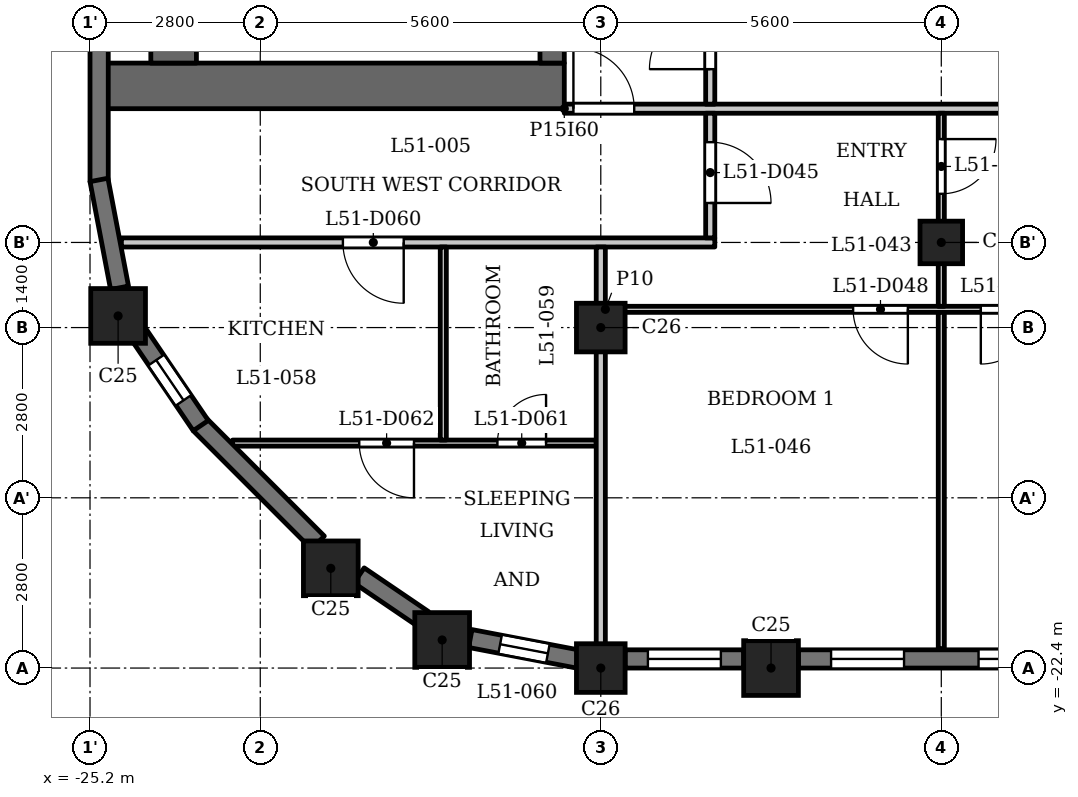
"""IFC4 building model, lengths in metres.
Left out: names, types, materials, properties, quantities, classifications, styles, units other than length and angle.
Written with IfcOpenShell. Run it as: python <this file> out.ifc"""

import sys

from ifc_helpers import new_model, si_unit, direction, frame, frame_2d, origin, origin_2d, place, context, subcontext, project, spatial, rectangle, extrude, element, fill, save


model = new_model("IFC4")
c1 = context("Model", 3, precision=1e-05, world=origin(), true_north=direction((0.0, 1.0)))
c2 = subcontext(c1, "Body", "Model", "MODEL_VIEW")
j1 = project(units=[si_unit("LENGTHUNIT", "METRE"), si_unit("PLANEANGLEUNIT", "RADIAN")], contexts=[c1])
p1 = place(None, origin())
s1 = spatial("IfcSite", under=j1, at=p1, CompositionType="ELEMENT")
p2 = place(p1, origin())
s2 = spatial("IfcBuilding", under=s1, at=p2, CompositionType="ELEMENT")
p3 = place(p2, frame((0.0, 0.0, 199.4)))
s3 = spatial("IfcBuildingStorey", under=s2, at=p3, CompositionType="ELEMENT", Elevation=199.4)
for number, where, z_axis, x_axis in (
    (1, (-19.409, -21.938, 0.0), (0.0, 0.0, 1.0), (1.0, 0.0, 0.0)),
    (2, (-14.0, -22.4, 0.0), (0.0, 0.0, 1.0), (1.0, 0.0, 0.0)),
    (3, (-24.738, -16.609, 0.0), (0.0, 0.0, 1.0), (1.0, 0.0, 0.0)),
    (4, (-21.24, -20.76, 0.0), (0.0, 0.0, 1.0), (1.0, 0.0, 0.0)),
):
    element("IfcColumn", number, at=place(p3, frame(where, z_axis=z_axis, x_axis=x_axis)), inside=s3, PredefinedType="COLUMN", context=c2, shape_type="SweptSolid", body=[
        extrude(rectangle(XDim=0.9, YDim=0.9, at=origin_2d()), origin(), (0.0, 0.0, 1.0), 3.5),
    ])
for number, where, z_axis, x_axis in (
    (5, (-16.8, -22.4, 0.0), (0.0, 0.0, 1.0), (1.0, 0.0, 0.0)),
    (6, (-16.8, -16.8, 0.0), (0.0, 0.0, 1.0), (1.0, 0.0, 0.0)),
):
    element("IfcColumn", number, at=place(p3, frame(where, z_axis=z_axis, x_axis=x_axis)), inside=s3, PredefinedType="COLUMN", context=c2, shape_type="SweptSolid", body=[
        extrude(rectangle(XDim=0.8, YDim=0.8, at=origin_2d()), origin(), (0.0, 0.0, 1.0), 3.5),
    ])
p4 = place(p3, frame((-11.2, -15.4, 0.0), z_axis=(0.0, 0.0, 1.0), x_axis=(1.0, 0.0, 0.0)))
e7 = element("IfcColumn", 7, at=p4, inside=s3, PredefinedType="COLUMN", context=c2, shape_type="SweptSolid", body=[
    extrude(rectangle(XDim=0.7, YDim=0.7, at=origin_2d()), origin(), (0.0, 0.0, 1.0), 3.5),
])
p5 = place(p3, frame((-23.397, -18.391, 0.0), z_axis=(0.0, 0.0, 1.0), x_axis=(0.707106781187, -0.707106781187, 0.0)))
e8 = element("IfcWall", 8, at=p5, inside=s3, PredefinedType="SOLIDWALL", context=c2, shape_type="SweptSolid", body=[
    extrude(rectangle(XDim=2.75, YDim=0.3, at=frame_2d((1.375, 0.0))), origin(), (0.0, 0.0, 1.0), 2.5),
])
p6 = place(p3, frame((-20.775, -20.876, 0.0), z_axis=(0.0, 0.0, 1.0), x_axis=(0.827075824828, -0.562090366388, 0.0)))
e9 = element("IfcWall", 9, at=p6, inside=s3, PredefinedType="SOLIDWALL", context=c2, shape_type="SweptSolid", body=[
    extrude(rectangle(XDim=1.277, YDim=0.3, at=frame_2d((0.638, 0.0))), origin(), (0.0, 0.0, 1.0), 2.5),
])
p7 = place(p3, frame((-18.946, -21.914, 0.0), z_axis=(0.0, 0.0, 1.0), x_axis=(0.98230529033, -0.187286722942, 0.0)))
e10 = element("IfcWall", 10, at=p7, inside=s3, PredefinedType="SOLIDWALL", context=c2, shape_type="SweptSolid", body=[
    extrude(rectangle(XDim=1.799, YDim=0.3, at=frame_2d((0.899, 0.0))), origin(), (0.0, 0.0, 1.0), 2.5),
])
p8 = place(p7, frame((0.5, 0.0, 0.6)))
e11 = element("IfcOpeningElement", 11, at=p8, cuts=e10, PredefinedType="OPENING", context=c2, shape_type="SweptSolid", body=[
    extrude(rectangle(XDim=0.8, YDim=1.55, at=frame_2d((0.4, 0.775))), frame((0.0, 0.16, 0.0), z_axis=(0.0, -1.0, 0.0), x_axis=(1.0, 0.0, 0.0)), (0.0, 0.0, 1.0), 0.32),
])
p9 = place(p3, frame((-16.4, -22.25, 0.0), z_axis=(0.0, 0.0, 1.0), x_axis=(1.0, 0.0, 0.0)))
e12 = element("IfcWall", 12, at=p9, inside=s3, PredefinedType="SOLIDWALL", context=c2, shape_type="SweptSolid", body=[
    extrude(rectangle(XDim=1.95, YDim=0.3, at=frame_2d((0.975, 0.0))), origin(), (0.0, 0.0, 1.0), 2.5),
])
p10 = place(p9, frame((0.375, 0.0, 0.6)))
e13 = element("IfcOpeningElement", 13, at=p10, cuts=e12, PredefinedType="OPENING", context=c2, shape_type="SweptSolid", body=[
    extrude(rectangle(XDim=1.2, YDim=1.55, at=frame_2d((0.6, 0.775))), frame((0.0, 0.16, 0.0), z_axis=(0.0, -1.0, 0.0), x_axis=(1.0, 0.0, 0.0)), (0.0, 0.0, 1.0), 0.32),
])
p11 = place(p3, frame((-13.55, -22.25, 0.0), z_axis=(0.0, 0.0, 1.0), x_axis=(1.0, 0.0, 0.0)))
e14 = element("IfcWall", 14, at=p11, inside=s3, PredefinedType="SOLIDWALL", context=c2, shape_type="SweptSolid", body=[
    extrude(rectangle(XDim=4.7, YDim=0.3, at=frame_2d((2.35, 0.0))), origin(), (0.0, 0.0, 1.0), 2.5),
])
p12 = place(p11, frame((0.538, 0.0, 0.6)))
e15 = element("IfcOpeningElement", 15, at=p12, cuts=e14, PredefinedType="OPENING", context=c2, shape_type="SweptSolid", body=[
    extrude(rectangle(XDim=1.2, YDim=1.55, at=frame_2d((0.6, 0.775))), frame((0.0, 0.16, 0.0), z_axis=(0.0, -1.0, 0.0), x_axis=(1.0, 0.0, 0.0)), (0.0, 0.0, 1.0), 0.32),
])
p13 = place(p11, frame((2.962, 0.0, 0.6)))
e16 = element("IfcOpeningElement", 16, at=p13, cuts=e14, PredefinedType="OPENING", context=c2, shape_type="SweptSolid", body=[
    extrude(rectangle(XDim=1.2, YDim=1.55, at=frame_2d((0.6, 0.775))), frame((0.0, 0.16, 0.0), z_axis=(0.0, -1.0, 0.0), x_axis=(1.0, 0.0, 0.0)), (0.0, 0.0, 1.0), 0.32),
])
p14 = place(p3, frame((-25.05, -11.65, 0.0), z_axis=(0.0, 0.0, 1.0), x_axis=(0.0, -1.0, 0.0)))
e17 = element("IfcWall", 17, at=p14, inside=s3, PredefinedType="SOLIDWALL", context=c2, shape_type="SweptSolid", body=[
    extrude(rectangle(XDim=2.75, YDim=0.3, at=frame_2d((1.375, 0.0))), origin(), (0.0, 0.0, 1.0), 2.5),
])
p15 = place(p3, frame((-25.053, -14.372, 0.0), z_axis=(0.0, 0.0, 1.0), x_axis=(0.187348135549, -0.982293579388, 0.0)))
e18 = element("IfcWall", 18, at=p15, inside=s3, PredefinedType="SOLIDWALL", context=c2, shape_type="SweptSolid", body=[
    extrude(rectangle(XDim=1.806, YDim=0.3, at=frame_2d((0.903, 0.0))), origin(), (0.0, 0.0, 1.0), 2.5),
])
p16 = place(p3, frame((-24.394, -16.919, 0.0), z_axis=(0.0, 0.0, 1.0), x_axis=(0.562040093569, -0.827109988588, 0.0)))
e19 = element("IfcWall", 19, at=p16, inside=s3, PredefinedType="SOLIDWALL", context=c2, shape_type="SweptSolid", body=[
    extrude(rectangle(XDim=1.806, YDim=0.3, at=frame_2d((0.903, 0.0))), origin(), (0.0, 0.0, 1.0), 2.5),
])
p17 = place(p16, frame((0.503, 0.0, 0.6)))
e20 = element("IfcOpeningElement", 20, at=p17, cuts=e19, PredefinedType="OPENING", context=c2, shape_type="SweptSolid", body=[
    extrude(rectangle(XDim=0.8, YDim=1.55, at=frame_2d((0.4, 0.775))), frame((0.0, 0.16, 0.0), z_axis=(0.0, -1.0, 0.0), x_axis=(1.0, 0.0, 0.0)), (0.0, 0.0, 1.0), 0.32),
])
p18 = place(p3, frame((-17.4, -12.825, 0.0), z_axis=(0.0, 0.0, 1.0), x_axis=(-1.0, 0.0, 0.0)))
e21 = element("IfcWall", 21, at=p18, inside=s3, PredefinedType="SHEAR", context=c2, shape_type="SweptSolid", body=[
    extrude(rectangle(XDim=7.6, YDim=0.75, at=frame_2d((3.8, 0.0))), origin(), (0.0, 0.0, 1.0), 3.2),
])
p19 = place(p3, frame((-17.6, -12.45, 0.0), z_axis=(0.0, 0.0, 1.0), x_axis=(0.0, 1.0, 0.0)))
e22 = element("IfcWall", 22, at=p19, inside=s3, PredefinedType="SHEAR", context=c2, shape_type="SweptSolid", body=[
    extrude(rectangle(XDim=24.9, YDim=0.4, at=frame_2d((12.45, 0.0))), origin(), (0.0, 0.0, 1.0), 3.2),
])
p20 = place(p19, frame((8.65, 0.0, 0.0)))
e23 = element("IfcOpeningElement", 23, at=p20, cuts=e22, PredefinedType="OPENING", context=c2, shape_type="SweptSolid", body=[
    extrude(rectangle(XDim=0.9, YDim=2.1, at=frame_2d((0.45, 1.05))), frame((0.0, 0.21, 0.0), z_axis=(0.0, -1.0, 0.0), x_axis=(1.0, 0.0, 0.0)), (0.0, 0.0, 1.0), 0.42),
])
p21 = place(p19, frame((15.6, 0.0, 0.0)))
e24 = element("IfcOpeningElement", 24, at=p21, cuts=e22, PredefinedType="OPENING", context=c2, shape_type="SweptSolid", body=[
    extrude(rectangle(XDim=1.1, YDim=2.1, at=frame_2d((0.55, 1.05))), frame((0.0, 0.21, 0.0), z_axis=(0.0, -1.0, 0.0), x_axis=(1.0, 0.0, 0.0)), (0.0, 0.0, 1.0), 0.42),
])
p22 = place(p19, frame((18.0, 0.0, 0.0)))
e25 = element("IfcOpeningElement", 25, at=p22, cuts=e22, PredefinedType="OPENING", context=c2, shape_type="SweptSolid", body=[
    extrude(rectangle(XDim=1.1, YDim=2.1, at=frame_2d((0.55, 1.05))), frame((0.0, 0.21, 0.0), z_axis=(0.0, -1.0, 0.0), x_axis=(1.0, 0.0, 0.0)), (0.0, 0.0, 1.0), 0.42),
])
p23 = place(p19, frame((23.025, 0.0, 0.0)))
e26 = element("IfcOpeningElement", 26, at=p23, cuts=e22, PredefinedType="OPENING", context=c2, shape_type="SweptSolid", body=[
    extrude(rectangle(XDim=1.1, YDim=2.1, at=frame_2d((0.55, 1.05))), frame((0.0, 0.21, 0.0), z_axis=(0.0, -1.0, 0.0), x_axis=(1.0, 0.0, 0.0)), (0.0, 0.0, 1.0), 0.42),
])
p24 = place(p19, frame((0.775, 0.0, 0.0)))
e27 = element("IfcOpeningElement", 27, at=p24, cuts=e22, PredefinedType="OPENING", context=c2, shape_type="SweptSolid", body=[
    extrude(rectangle(XDim=1.1, YDim=2.1, at=frame_2d((0.55, 1.05))), frame((0.0, 0.21, 0.0), z_axis=(0.0, -1.0, 0.0), x_axis=(1.0, 0.0, 0.0)), (0.0, 0.0, 1.0), 0.42),
])
p25 = place(p19, frame((12.925, 0.0, 0.0)))
e28 = element("IfcOpeningElement", 28, at=p25, cuts=e22, PredefinedType="OPENING", context=c2, shape_type="SweptSolid", body=[
    extrude(rectangle(XDim=1.8, YDim=2.1, at=frame_2d((0.9, 1.05))), frame((0.0, 0.21, 0.0), z_axis=(0.0, -1.0, 0.0), x_axis=(1.0, 0.0, 0.0)), (0.0, 0.0, 1.0), 0.42),
])
p26 = place(p3, frame((-23.825, -12.45, 0.0), z_axis=(0.0, 0.0, 1.0), x_axis=(0.0, 1.0, 0.0)))
e29 = element("IfcWall", 29, at=p26, inside=s3, PredefinedType="SHEAR", context=c2, shape_type="SweptSolid", body=[
    extrude(rectangle(XDim=24.9, YDim=0.75, at=frame_2d((12.45, 0.0))), origin(), (0.0, 0.0, 1.0), 3.2),
])
p27 = place(p3, frame((-22.856, -18.7, 0.0), z_axis=(0.0, 0.0, 1.0), x_axis=(1.0, 0.0, 0.0)))
e30 = element("IfcWall", 30, at=p27, inside=s3, PredefinedType="PARTITIONING", context=c2, shape_type="SweptSolid", body=[
    extrude(rectangle(XDim=5.981, YDim=0.1, at=frame_2d((2.99, 0.0))), origin(), (0.0, 0.0, 1.0), 3.2),
])
p28 = place(p27, frame((4.356, 0.0, 0.0)))
e31 = element("IfcOpeningElement", 31, at=p28, cuts=e30, PredefinedType="OPENING", context=c2, shape_type="SweptSolid", body=[
    extrude(rectangle(XDim=0.8, YDim=2.1, at=frame_2d((0.4, 1.05))), frame((0.0, 0.06, 0.0), z_axis=(0.0, -1.0, 0.0), x_axis=(1.0, 0.0, 0.0)), (0.0, 0.0, 1.0), 0.12),
])
p29 = place(p27, frame((2.084, 0.0, 0.0)))
e32 = element("IfcOpeningElement", 32, at=p29, cuts=e30, PredefinedType="OPENING", context=c2, shape_type="SweptSolid", body=[
    extrude(rectangle(XDim=0.9, YDim=2.1, at=frame_2d((0.45, 1.05))), frame((0.0, 0.06, 0.0), z_axis=(0.0, -1.0, 0.0), x_axis=(1.0, 0.0, 0.0)), (0.0, 0.0, 1.0), 0.12),
])
p30 = place(p3, frame((-16.725, -16.5, 0.0), z_axis=(0.0, 0.0, 1.0), x_axis=(1.0, 0.0, 0.0)))
e33 = element("IfcWall", 33, at=p30, inside=s3, PredefinedType="PARTITIONING", context=c2, shape_type="SweptSolid", body=[
    extrude(rectangle(XDim=33.45, YDim=0.1, at=frame_2d((16.725, 0.0))), origin(), (0.0, 0.0, 1.0), 3.2),
])
p31 = place(p30, frame((4.075, 0.0, 0.0)))
e34 = element("IfcOpeningElement", 34, at=p31, cuts=e33, PredefinedType="OPENING", context=c2, shape_type="SweptSolid", body=[
    extrude(rectangle(XDim=0.9, YDim=2.1, at=frame_2d((0.45, 1.05))), frame((0.0, 0.06, 0.0), z_axis=(0.0, -1.0, 0.0), x_axis=(1.0, 0.0, 0.0)), (0.0, 0.0, 1.0), 0.12),
])
p32 = place(p30, frame((6.175, 0.0, 0.0)))
e35 = element("IfcOpeningElement", 35, at=p32, cuts=e33, PredefinedType="OPENING", context=c2, shape_type="SweptSolid", body=[
    extrude(rectangle(XDim=0.9, YDim=2.1, at=frame_2d((0.45, 1.05))), frame((0.0, 0.06, 0.0), z_axis=(0.0, -1.0, 0.0), x_axis=(1.0, 0.0, 0.0)), (0.0, 0.0, 1.0), 0.12),
])
p33 = place(p30, frame((30.575, 0.0, 0.0)))
e36 = element("IfcOpeningElement", 36, at=p33, cuts=e33, PredefinedType="OPENING", context=c2, shape_type="SweptSolid", body=[
    extrude(rectangle(XDim=0.9, YDim=2.1, at=frame_2d((0.45, 1.05))), frame((0.0, 0.06, 0.0), z_axis=(0.0, -1.0, 0.0), x_axis=(1.0, 0.0, 0.0)), (0.0, 0.0, 1.0), 0.12),
])
p34 = place(p30, frame((22.975, 0.0, 0.0)))
e37 = element("IfcOpeningElement", 37, at=p34, cuts=e33, PredefinedType="OPENING", context=c2, shape_type="SweptSolid", body=[
    extrude(rectangle(XDim=0.9, YDim=2.1, at=frame_2d((0.45, 1.05))), frame((0.0, 0.06, 0.0), z_axis=(0.0, -1.0, 0.0), x_axis=(1.0, 0.0, 0.0)), (0.0, 0.0, 1.0), 0.12),
])
p35 = place(p3, frame((-24.684, -15.4, 0.0), z_axis=(0.0, 0.0, 1.0), x_axis=(1.0, 0.0, 0.0)))
e38 = element("IfcWall", 38, at=p35, inside=s3, PredefinedType="PARTITIONING", context=c2, shape_type="SweptSolid", body=[
    extrude(rectangle(XDim=9.759, YDim=0.15, at=frame_2d((4.879, 0.0))), origin(), (0.0, 0.0, 1.0), 3.2),
])
p36 = place(p35, frame((3.643, 0.0, 0.0)))
e39 = element("IfcOpeningElement", 39, at=p36, cuts=e38, PredefinedType="OPENING", context=c2, shape_type="SweptSolid", body=[
    extrude(rectangle(XDim=1.0, YDim=2.1, at=frame_2d((0.5, 1.05))), frame((0.0, 0.085, 0.0), z_axis=(0.0, -1.0, 0.0), x_axis=(1.0, 0.0, 0.0)), (0.0, 0.0, 1.0), 0.17),
])
p37 = place(p3, frame((-17.4, -13.2, 0.0), z_axis=(0.0, 0.0, 1.0), x_axis=(1.0, 0.0, 0.0)))
e40 = element("IfcWall", 40, at=p37, inside=s3, PredefinedType="PARTITIONING", context=c2, shape_type="SweptSolid", body=[
    extrude(rectangle(XDim=34.8, YDim=0.15, at=frame_2d((17.4, 0.0))), origin(), (0.0, 0.0, 1.0), 3.2),
])
p38 = place(p37, frame((0.15, 0.0, 0.0)))
e41 = element("IfcOpeningElement", 41, at=p38, cuts=e40, PredefinedType="OPENING", context=c2, shape_type="SweptSolid", body=[
    extrude(rectangle(XDim=1.0, YDim=2.1, at=frame_2d((0.5, 1.05))), frame((0.0, 0.085, 0.0), z_axis=(0.0, -1.0, 0.0), x_axis=(1.0, 0.0, 0.0)), (0.0, 0.0, 1.0), 0.17),
])
p39 = place(p37, frame((33.55, 0.0, 0.0)))
e42 = element("IfcOpeningElement", 42, at=p39, cuts=e40, PredefinedType="OPENING", context=c2, shape_type="SweptSolid", body=[
    extrude(rectangle(XDim=1.0, YDim=2.1, at=frame_2d((0.5, 1.05))), frame((0.0, 0.085, 0.0), z_axis=(0.0, -1.0, 0.0), x_axis=(1.0, 0.0, 0.0)), (0.0, 0.0, 1.0), 0.17),
])
p40 = place(p3, frame((-19.39, -18.65, 0.0), z_axis=(0.0, 0.0, 1.0), x_axis=(0.0, 1.0, 0.0)))
e43 = element("IfcWall", 43, at=p40, inside=s3, PredefinedType="PARTITIONING", context=c2, shape_type="SweptSolid", body=[
    extrude(rectangle(XDim=3.175, YDim=0.1, at=frame_2d((1.587, 0.0))), origin(), (0.0, 0.0, 1.0), 3.2),
])
p41 = place(p3, frame((-16.8, -22.31, 0.0), z_axis=(0.0, 0.0, 1.0), x_axis=(0.0, 1.0, 0.0)))
e44 = element("IfcWall", 44, at=p41, inside=s3, PredefinedType="PARTITIONING", context=c2, shape_type="SweptSolid", body=[
    extrude(rectangle(XDim=6.835, YDim=0.15, at=frame_2d((3.417, 0.0))), origin(), (0.0, 0.0, 1.0), 2.55),
])
p42 = place(p3, frame((-15.0, -15.325, 0.0), z_axis=(0.0, 0.0, 1.0), x_axis=(0.0, 1.0, 0.0)))
e45 = element("IfcWall", 45, at=p42, inside=s3, PredefinedType="PARTITIONING", context=c2, shape_type="SweptSolid", body=[
    extrude(rectangle(XDim=2.05, YDim=0.15, at=frame_2d((1.025, 0.0))), origin(), (0.0, 0.0, 1.0), 3.2),
])
p43 = place(p42, frame((0.574, 0.0, 0.0)))
e46 = element("IfcOpeningElement", 46, at=p43, cuts=e45, PredefinedType="OPENING", context=c2, shape_type="SweptSolid", body=[
    extrude(rectangle(XDim=1.0, YDim=2.1, at=frame_2d((0.5, 1.05))), frame((0.0, 0.085, 0.0), z_axis=(0.0, -1.0, 0.0), x_axis=(1.0, 0.0, 0.0)), (0.0, 0.0, 1.0), 0.17),
])
p44 = place(p3, frame((-15.0, -13.125, 0.0), z_axis=(0.0, 0.0, 1.0), x_axis=(0.0, 1.0, 0.0)))
e47 = element("IfcWall", 47, at=p44, inside=s3, PredefinedType="PARTITIONING", context=c2, shape_type="SweptSolid", body=[
    extrude(rectangle(XDim=6.356, YDim=0.15, at=frame_2d((3.178, 0.0))), origin(), (0.0, 0.0, 1.0), 3.2),
])
p45 = place(p44, frame((0.575, 0.0, 0.0)))
e48 = element("IfcOpeningElement", 48, at=p45, cuts=e47, PredefinedType="OPENING", context=c2, shape_type="SweptSolid", body=[
    extrude(rectangle(XDim=1.0, YDim=2.1, at=frame_2d((0.5, 1.05))), frame((0.0, 0.085, 0.0), z_axis=(0.0, -1.0, 0.0), x_axis=(1.0, 0.0, 0.0)), (0.0, 0.0, 1.0), 0.17),
])
p46 = place(p3, frame((-11.2, -22.08, 0.0), z_axis=(0.0, 0.0, 1.0), x_axis=(0.0, 1.0, 0.0)))
e49 = element("IfcWall", 49, at=p46, inside=s3, PredefinedType="PARTITIONING", context=c2, shape_type="SweptSolid", body=[
    extrude(rectangle(XDim=5.53, YDim=0.1, at=frame_2d((2.765, 0.0))), origin(), (0.0, 0.0, 1.0), 3.2),
])
p47 = place(p3, frame((-11.2, -16.45, 0.0), z_axis=(0.0, 0.0, 1.0), x_axis=(0.0, 1.0, 0.0)))
e50 = element("IfcWall", 50, at=p47, inside=s3, PredefinedType="PARTITIONING", context=c2, shape_type="SweptSolid", body=[
    extrude(rectangle(XDim=3.175, YDim=0.1, at=frame_2d((1.587, 0.0))), origin(), (0.0, 0.0, 1.0), 3.2),
])
p48 = place(p47, frame((1.85, 0.0, 0.0)))
e51 = element("IfcOpeningElement", 51, at=p48, cuts=e50, PredefinedType="OPENING", context=c2, shape_type="SweptSolid", body=[
    extrude(rectangle(XDim=0.9, YDim=2.1, at=frame_2d((0.45, 1.05))), frame((0.0, 0.06, 0.0), z_axis=(0.0, -1.0, 0.0), x_axis=(1.0, 0.0, 0.0)), (0.0, 0.0, 1.0), 0.12),
])
p49 = place(p45, origin())
e52 = element("IfcDoor", 52, at=p49, inside=s3, OperationType="SINGLE_SWING_RIGHT", PredefinedType="DOOR", context=c2, shape_type="SweptSolid", body=[
    extrude(rectangle(XDim=1.0, YDim=2.1, at=frame_2d((0.5, 1.05))), frame((0.0, 0.025, 0.0), z_axis=(0.0, -1.0, 0.0), x_axis=(1.0, 0.0, 0.0)), (0.0, 0.0, 1.0), 0.05),
])
fill(e48, e52)
p50 = place(p38, origin())
e53 = element("IfcDoor", 53, at=p50, inside=s3, OperationType="SINGLE_SWING_RIGHT", PredefinedType="DOOR", context=c2, shape_type="SweptSolid", body=[
    extrude(rectangle(XDim=1.0, YDim=2.1, at=frame_2d((0.5, 1.05))), frame((0.0, 0.025, 0.0), z_axis=(0.0, -1.0, 0.0), x_axis=(1.0, 0.0, 0.0)), (0.0, 0.0, 1.0), 0.05),
])
fill(e41, e53)
p51 = place(p43, origin())
e54 = element("IfcDoor", 54, at=p51, inside=s3, OperationType="SINGLE_SWING_LEFT", PredefinedType="DOOR", context=c2, shape_type="SweptSolid", body=[
    extrude(rectangle(XDim=1.0, YDim=2.1, at=frame_2d((0.5, 1.05))), frame((0.0, 0.025, 0.0), z_axis=(0.0, -1.0, 0.0), x_axis=(1.0, 0.0, 0.0)), (0.0, 0.0, 1.0), 0.05),
])
fill(e46, e54)
p52 = place(p48, origin())
e55 = element("IfcDoor", 55, at=p52, inside=s3, OperationType="SINGLE_SWING_RIGHT", PredefinedType="DOOR", context=c2, shape_type="SweptSolid", body=[
    extrude(rectangle(XDim=0.9, YDim=2.1, at=frame_2d((0.45, 1.05))), frame((0.0, 0.025, 0.0), z_axis=(0.0, -1.0, 0.0), x_axis=(1.0, 0.0, 0.0)), (0.0, 0.0, 1.0), 0.05),
])
fill(e51, e55)
p53 = place(p31, origin())
e56 = element("IfcDoor", 56, at=p53, inside=s3, OperationType="SINGLE_SWING_RIGHT", PredefinedType="DOOR", context=c2, shape_type="SweptSolid", body=[
    extrude(rectangle(XDim=0.9, YDim=2.1, at=frame_2d((0.45, 1.05))), frame((0.0, 0.025, 0.0), z_axis=(0.0, -1.0, 0.0), x_axis=(1.0, 0.0, 0.0)), (0.0, 0.0, 1.0), 0.05),
])
fill(e34, e56)
p54 = place(p32, origin())
e57 = element("IfcDoor", 57, at=p54, inside=s3, OperationType="SINGLE_SWING_LEFT", PredefinedType="DOOR", context=c2, shape_type="SweptSolid", body=[
    extrude(rectangle(XDim=0.9, YDim=2.1, at=frame_2d((0.45, 1.05))), frame((0.0, 0.025, 0.0), z_axis=(0.0, -1.0, 0.0), x_axis=(1.0, 0.0, 0.0)), (0.0, 0.0, 1.0), 0.05),
])
fill(e35, e57)
p55 = place(p36, origin())
e58 = element("IfcDoor", 58, at=p55, inside=s3, OperationType="SINGLE_SWING_RIGHT", PredefinedType="DOOR", context=c2, shape_type="SweptSolid", body=[
    extrude(rectangle(XDim=1.0, YDim=2.1, at=frame_2d((0.5, 1.05))), frame((0.0, 0.025, 0.0), z_axis=(0.0, -1.0, 0.0), x_axis=(1.0, 0.0, 0.0)), (0.0, 0.0, 1.0), 0.05),
])
fill(e39, e58)
p56 = place(p28, origin())
e59 = element("IfcDoor", 59, at=p56, inside=s3, OperationType="SINGLE_SWING_LEFT", PredefinedType="DOOR", context=c2, shape_type="SweptSolid", body=[
    extrude(rectangle(XDim=0.8, YDim=2.1, at=frame_2d((0.4, 1.05))), frame((0.0, 0.025, 0.0), z_axis=(0.0, -1.0, 0.0), x_axis=(1.0, 0.0, 0.0)), (0.0, 0.0, 1.0), 0.05),
])
fill(e31, e59)
p57 = place(p29, origin())
e60 = element("IfcDoor", 60, at=p57, inside=s3, OperationType="SINGLE_SWING_RIGHT", PredefinedType="DOOR", context=c2, shape_type="SweptSolid", body=[
    extrude(rectangle(XDim=0.9, YDim=2.1, at=frame_2d((0.45, 1.05))), frame((0.0, 0.025, 0.0), z_axis=(0.0, -1.0, 0.0), x_axis=(1.0, 0.0, 0.0)), (0.0, 0.0, 1.0), 0.05),
])
fill(e32, e60)
p58 = place(p8, origin())
e61 = element("IfcWindow", 61, at=p58, inside=s3, PartitioningType="SINGLE_PANEL", PredefinedType="WINDOW", context=c2, shape_type="SweptSolid", body=[
    extrude(rectangle(XDim=0.8, YDim=1.55, at=frame_2d((0.4, 0.775))), frame((0.0, 0.03, 0.0), z_axis=(0.0, -1.0, 0.0), x_axis=(1.0, 0.0, 0.0)), (0.0, 0.0, 1.0), 0.06),
])
fill(e11, e61)
p59 = place(p10, origin())
e62 = element("IfcWindow", 62, at=p59, inside=s3, PartitioningType="SINGLE_PANEL", PredefinedType="WINDOW", context=c2, shape_type="SweptSolid", body=[
    extrude(rectangle(XDim=1.2, YDim=1.55, at=frame_2d((0.6, 0.775))), frame((0.0, 0.03, 0.0), z_axis=(0.0, -1.0, 0.0), x_axis=(1.0, 0.0, 0.0)), (0.0, 0.0, 1.0), 0.06),
])
fill(e13, e62)
p60 = place(p12, origin())
e63 = element("IfcWindow", 63, at=p60, inside=s3, PartitioningType="SINGLE_PANEL", PredefinedType="WINDOW", context=c2, shape_type="SweptSolid", body=[
    extrude(rectangle(XDim=1.2, YDim=1.55, at=frame_2d((0.6, 0.775))), frame((0.0, 0.03, 0.0), z_axis=(0.0, -1.0, 0.0), x_axis=(1.0, 0.0, 0.0)), (0.0, 0.0, 1.0), 0.06),
])
fill(e15, e63)
p61 = place(p13, origin())
e64 = element("IfcWindow", 64, at=p61, inside=s3, PartitioningType="SINGLE_PANEL", PredefinedType="WINDOW", context=c2, shape_type="SweptSolid", body=[
    extrude(rectangle(XDim=1.2, YDim=1.55, at=frame_2d((0.6, 0.775))), frame((0.0, 0.03, 0.0), z_axis=(0.0, -1.0, 0.0), x_axis=(1.0, 0.0, 0.0)), (0.0, 0.0, 1.0), 0.06),
])
fill(e16, e64)
p62 = place(p17, origin())
e65 = element("IfcWindow", 65, at=p62, inside=s3, PartitioningType="SINGLE_PANEL", PredefinedType="WINDOW", context=c2, shape_type="SweptSolid", body=[
    extrude(rectangle(XDim=0.8, YDim=1.55, at=frame_2d((0.4, 0.775))), frame((0.0, 0.03, 0.0), z_axis=(0.0, -1.0, 0.0), x_axis=(1.0, 0.0, 0.0)), (0.0, 0.0, 1.0), 0.06),
])
fill(e20, e65)
save(model, sys.argv[1])
